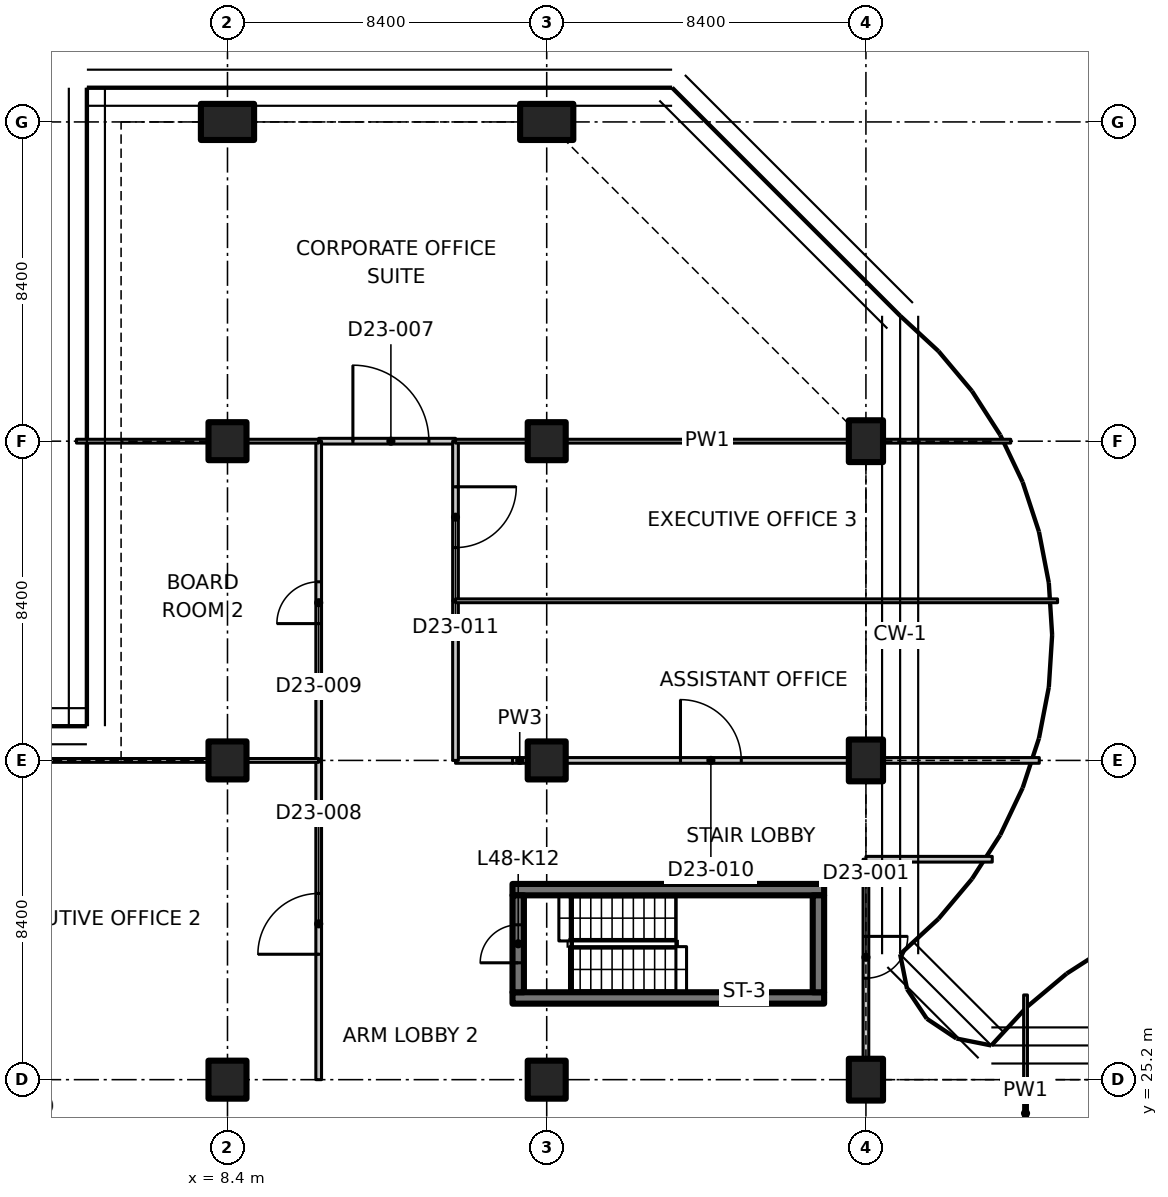
"""IFC4 building model, lengths in metres.
Left out: names, types, materials, properties, quantities, classifications, styles, units other than length and angle.
Written with IfcOpenShell. Run it as: python <this file> out.ifc"""

import sys

from ifc_helpers import new_model, si_unit, direction, frame, frame_2d, origin, origin_2d, place, context, subcontext, project, spatial, polyline, rectangle, outline, extrude, element, fill, save


model = new_model("IFC4")
c1 = context("Model", 3, precision=1e-05, world=origin(), true_north=direction((0.0, 1.0)))
c2 = subcontext(c1, "Body", "Model", "MODEL_VIEW")
j1 = project(units=[si_unit("LENGTHUNIT", "METRE"), si_unit("PLANEANGLEUNIT", "RADIAN")], contexts=[c1])
p1 = place(None, origin())
s1 = spatial("IfcSite", under=j1, at=p1, CompositionType="ELEMENT")
p2 = place(p1, origin())
s2 = spatial("IfcBuilding", under=s1, at=p2, CompositionType="ELEMENT")
p3 = place(p2, frame((0.0, 0.0, 192.0)))
s3 = spatial("IfcBuildingStorey", under=s2, at=p3, CompositionType="ELEMENT", Elevation=192.0)
for number, where, z_axis, x_axis in (
    (1, (8.4, 25.2, 0.0), (0.0, 0.0, 1.0), (1.0, 0.0, 0.0)),
    (2, (8.4, 33.6, 0.0), (0.0, 0.0, 1.0), (1.0, 0.0, 0.0)),
    (3, (8.4, 42.0, 0.0), (0.0, 0.0, 1.0), (1.0, 0.0, 0.0)),
):
    element("IfcColumn", number, at=place(p3, frame(where, z_axis=z_axis, x_axis=x_axis)), inside=s3, PredefinedType="COLUMN", context=c2, shape_type="SweptSolid", body=[
        extrude(rectangle(XDim=1.0, YDim=1.0, at=origin_2d()), origin(), (0.0, 0.0, 1.0), 3.35),
    ])
p4 = place(p3, frame((8.4, 50.4, 0.0), z_axis=(0.0, 0.0, 1.0), x_axis=(0.0, 1.0, 0.0)))
e4 = element("IfcColumn", 4, at=p4, inside=s3, PredefinedType="COLUMN", context=c2, shape_type="SweptSolid", body=[
    extrude(rectangle(XDim=0.95, YDim=1.4, at=origin_2d()), origin(), (0.0, 0.0, 1.0), 3.35),
])
for number, where, z_axis, x_axis in (
    (5, (16.8, 25.2, 0.0), (0.0, 0.0, 1.0), (1.0, 0.0, 0.0)),
    (6, (16.8, 33.6, 0.0), (0.0, 0.0, 1.0), (1.0, 0.0, 0.0)),
    (7, (16.8, 42.0, 0.0), (0.0, 0.0, 1.0), (1.0, 0.0, 0.0)),
):
    element("IfcColumn", number, at=place(p3, frame(where, z_axis=z_axis, x_axis=x_axis)), inside=s3, PredefinedType="COLUMN", context=c2, shape_type="SweptSolid", body=[
        extrude(rectangle(XDim=1.0, YDim=1.0, at=origin_2d()), origin(), (0.0, 0.0, 1.0), 3.35),
    ])
p5 = place(p3, frame((16.8, 50.4, 0.0), z_axis=(0.0, 0.0, 1.0), x_axis=(0.0, 1.0, 0.0)))
e8 = element("IfcColumn", 8, at=p5, inside=s3, PredefinedType="COLUMN", context=c2, shape_type="SweptSolid", body=[
    extrude(rectangle(XDim=0.95, YDim=1.4, at=origin_2d()), origin(), (0.0, 0.0, 1.0), 3.35),
])
for number, where, z_axis, x_axis in (
    (9, (25.2, 25.2, 0.0), (0.0, 0.0, 1.0), (1.0, 0.0, 0.0)),
    (10, (25.2, 33.6, 0.0), (0.0, 0.0, 1.0), (1.0, 0.0, 0.0)),
    (11, (25.2, 42.0, 0.0), (0.0, 0.0, 1.0), (1.0, 0.0, 0.0)),
):
    element("IfcColumn", number, at=place(p3, frame(where, z_axis=z_axis, x_axis=x_axis)), inside=s3, PredefinedType="COLUMN", context=c2, shape_type="SweptSolid", body=[
        extrude(rectangle(XDim=0.9, YDim=1.1, at=origin_2d()), origin(), (0.0, 0.0, 1.0), 3.35),
    ])
for number, where, z_axis, x_axis in (
    (12, (15.9, 27.35, 0.0), (0.0, 0.0, 1.0), (1.0, 0.0, 0.0)),
    (13, (15.9, 30.2, 0.0), (0.0, 0.0, 1.0), (1.0, 0.0, 0.0)),
):
    element("IfcWall", number, at=place(p3, frame(where, z_axis=z_axis, x_axis=x_axis)), inside=s3, PredefinedType="SHEAR", context=c2, shape_type="SweptSolid", body=[
        extrude(rectangle(XDim=8.2, YDim=0.3, at=frame_2d((4.1, 0.0))), origin(), (0.0, 0.0, 1.0), 3.35),
    ])
p6 = place(p3, frame((16.05, 27.5, 0.0), z_axis=(0.0, 0.0, 1.0), x_axis=(0.0, 1.0, 0.0)))
e14 = element("IfcWall", 14, at=p6, inside=s3, PredefinedType="SHEAR", context=c2, shape_type="SweptSolid", body=[
    extrude(rectangle(XDim=2.55, YDim=0.3, at=frame_2d((1.275, 0.0))), origin(), (0.0, 0.0, 1.0), 3.35),
])
p7 = place(p6, frame((0.775, 0.0, 0.0)))
e15 = element("IfcOpeningElement", 15, at=p7, cuts=e14, PredefinedType="OPENING", context=c2, shape_type="SweptSolid", body=[
    extrude(rectangle(XDim=1.0, YDim=2.1, at=frame_2d((0.5, 1.05))), frame((0.0, 0.16, 0.0), z_axis=(0.0, -1.0, 0.0), x_axis=(1.0, 0.0, 0.0)), (0.0, 0.0, 1.0), 0.32),
])
p8 = place(p3, frame((23.95, 27.5, 0.0), z_axis=(0.0, 0.0, 1.0), x_axis=(0.0, 1.0, 0.0)))
e16 = element("IfcWall", 16, at=p8, inside=s3, PredefinedType="SHEAR", context=c2, shape_type="SweptSolid", body=[
    extrude(rectangle(XDim=2.55, YDim=0.3, at=frame_2d((1.275, 0.0))), origin(), (0.0, 0.0, 1.0), 3.35),
])
p9 = place(p3, frame((29.4, 27.429, 0.0), z_axis=(0.0, 0.0, 1.0), x_axis=(0.0, -1.0, 0.0)))
e17 = element("IfcWall", 17, at=p9, inside=s3, PredefinedType="PARTITIONING", context=c2, shape_type="SweptSolid", body=[
    extrude(outline(polyline([(0.0, 0.0), (6.229, 0.0), (6.229, 3.33), (2.679, 3.33), (2.677, 2.98), (1.781, 2.98), (1.779, 3.33), (0.154, 3.33), (0.0, 3.33), (0.0, 0.0)])), frame((0.0, 0.05, 0.0), z_axis=(0.0, -1.0, 0.0), x_axis=(1.0, 0.0, 0.0)), (0.0, 0.0, 1.0), 0.1),
])
p10 = place(p3, frame((25.2, 31.0, 0.0), z_axis=(0.0, 0.0, 1.0), x_axis=(0.0, -1.0, 0.0)))
e18 = element("IfcWall", 18, at=p10, inside=s3, PredefinedType="PARTITIONING", context=c2, shape_type="SweptSolid", body=[
    extrude(outline(polyline([(0.0, 0.0), (5.23, 0.0), (5.23, 2.98), (0.0, 2.98), (0.0, 0.0)])), frame((0.0, 0.075, 0.0), z_axis=(0.0, -1.0, 0.0), x_axis=(1.0, 0.0, 0.0)), (0.0, 0.0, 1.0), 0.15),
])
p11 = place(p10, frame((2.03, 0.0, 0.0)))
e19 = element("IfcOpeningElement", 19, at=p11, cuts=e18, PredefinedType="OPENING", context=c2, shape_type="SweptSolid", body=[
    extrude(rectangle(XDim=1.1, YDim=2.1, at=frame_2d((0.55, 1.05))), frame((0.0, 0.085, 0.0), z_axis=(0.0, -1.0, 0.0), x_axis=(1.0, 0.0, 0.0)), (0.0, 0.0, 1.0), 0.17),
])
p12 = place(p3, frame((25.2, 31.0, 0.0), z_axis=(0.0, 0.0, 1.0), x_axis=(1.0, 0.0, 0.0)))
e20 = element("IfcWall", 20, at=p12, inside=s3, PredefinedType="PARTITIONING", context=c2, shape_type="SweptSolid", body=[
    extrude(rectangle(XDim=3.324, YDim=0.15, at=frame_2d((1.662, 0.0))), origin(), (0.0, 0.0, 1.0), 2.98),
])
p13 = place(p3, frame((10.8, 25.2, 0.0), z_axis=(0.0, 0.0, 1.0), x_axis=(0.0, 1.0, 0.0)))
e21 = element("IfcWall", 21, at=p13, inside=s3, PredefinedType="PARTITIONING", context=c2, shape_type="SweptSolid", body=[
    extrude(rectangle(XDim=8.4, YDim=0.15, at=frame_2d((4.2, 0.0))), origin(), (0.0, 0.0, 1.0), 3.33),
])
p14 = place(p13, frame((3.3, 0.0, 0.0)))
e22 = element("IfcOpeningElement", 22, at=p14, cuts=e21, PredefinedType="OPENING", context=c2, shape_type="SweptSolid", body=[
    extrude(rectangle(XDim=1.6, YDim=2.1, at=frame_2d((0.8, 1.05))), frame((0.0, 0.085, 0.0), z_axis=(0.0, -1.0, 0.0), x_axis=(1.0, 0.0, 0.0)), (0.0, 0.0, 1.0), 0.17),
])
p15 = place(p3, frame((14.4, 33.6, 0.0), z_axis=(0.0, 0.0, 1.0), x_axis=(1.0, 0.0, 0.0)))
e23 = element("IfcWall", 23, at=p15, inside=s3, PredefinedType="PARTITIONING", context=c2, shape_type="SweptSolid", body=[
    extrude(rectangle(XDim=1.5, YDim=0.15, at=frame_2d((0.75, 0.0))), origin(), (0.0, 0.0, 1.0), 3.33),
])
p16 = place(p3, frame((15.9, 33.6, 0.0), z_axis=(0.0, 0.0, 1.0), x_axis=(1.0, 0.0, 0.0)))
e24 = element("IfcWall", 24, at=p16, inside=s3, PredefinedType="PARTITIONING", context=c2, shape_type="SweptSolid", body=[
    extrude(rectangle(XDim=0.38, YDim=0.15, at=frame_2d((0.19, 0.0))), origin(), (0.0, 0.0, 1.0), 3.33),
])
p17 = place(p3, frame((17.32, 33.6, 0.0), z_axis=(0.0, 0.0, 1.0), x_axis=(1.0, 0.0, 0.0)))
e25 = element("IfcWall", 25, at=p17, inside=s3, PredefinedType="PARTITIONING", context=c2, shape_type="SweptSolid", body=[
    extrude(rectangle(XDim=7.41, YDim=0.15, at=frame_2d((3.705, 0.0))), origin(), (0.0, 0.0, 1.0), 3.33),
])
p18 = place(p17, frame((3.0, 0.0, 0.0)))
e26 = element("IfcOpeningElement", 26, at=p18, cuts=e25, PredefinedType="OPENING", context=c2, shape_type="SweptSolid", body=[
    extrude(rectangle(XDim=1.6, YDim=2.1, at=frame_2d((0.8, 1.05))), frame((0.0, 0.085, 0.0), z_axis=(0.0, -1.0, 0.0), x_axis=(1.0, 0.0, 0.0)), (0.0, 0.0, 1.0), 0.17),
])
p19 = place(p3, frame((25.67, 33.6, 0.0), z_axis=(0.0, 0.0, 1.0), x_axis=(1.0, 0.0, 0.0)))
e27 = element("IfcWall", 27, at=p19, inside=s3, PredefinedType="PARTITIONING", context=c2, shape_type="SweptSolid", body=[
    extrude(rectangle(XDim=4.092, YDim=0.15, at=frame_2d((2.046, 0.0))), origin(), (0.0, 0.0, 1.0), 2.98),
])
p20 = place(p3, frame((10.8, 42.0, 0.0), z_axis=(0.0, 0.0, 1.0), x_axis=(1.0, 0.0, 0.0)))
e28 = element("IfcWall", 28, at=p20, inside=s3, PredefinedType="PARTITIONING", context=c2, shape_type="SweptSolid", body=[
    extrude(rectangle(XDim=3.6, YDim=0.15, at=frame_2d((1.8, 0.0))), origin(), (0.0, 0.0, 1.0), 3.33),
])
p21 = place(p20, frame((0.9, 0.0, 0.0)))
e29 = element("IfcOpeningElement", 29, at=p21, cuts=e28, PredefinedType="OPENING", context=c2, shape_type="SweptSolid", body=[
    extrude(rectangle(XDim=2.0, YDim=2.4, at=frame_2d((1.0, 1.2))), frame((0.0, 0.085, 0.0), z_axis=(0.0, -1.0, 0.0), x_axis=(1.0, 0.0, 0.0)), (0.0, 0.0, 1.0), 0.17),
])
p22 = place(p3, frame((10.8, 33.6, 0.0), z_axis=(0.0, 0.0, 1.0), x_axis=(0.0, 1.0, 0.0)))
e30 = element("IfcWall", 30, at=p22, inside=s3, PredefinedType="PARTITIONING", context=c2, shape_type="SweptSolid", body=[
    extrude(rectangle(XDim=8.4, YDim=0.15, at=frame_2d((4.2, 0.0))), origin(), (0.0, 0.0, 1.0), 3.33),
])
p23 = place(p22, frame((3.6, 0.0, 0.0)))
e31 = element("IfcOpeningElement", 31, at=p23, cuts=e30, PredefinedType="OPENING", context=c2, shape_type="SweptSolid", body=[
    extrude(rectangle(XDim=1.1, YDim=2.1, at=frame_2d((0.55, 1.05))), frame((0.0, 0.085, 0.0), z_axis=(0.0, -1.0, 0.0), x_axis=(1.0, 0.0, 0.0)), (0.0, 0.0, 1.0), 0.17),
])
p24 = place(p3, frame((14.4, 37.8, 0.0), z_axis=(0.0, 0.0, 1.0), x_axis=(0.0, -1.0, 0.0)))
e32 = element("IfcWall", 32, at=p24, inside=s3, PredefinedType="PARTITIONING", context=c2, shape_type="SweptSolid", body=[
    extrude(rectangle(XDim=4.2, YDim=0.15, at=frame_2d((2.1, 0.0))), origin(), (0.0, 0.0, 1.0), 3.33),
])
p25 = place(p3, frame((14.4, 42.0, 0.0), z_axis=(0.0, 0.0, 1.0), x_axis=(0.0, -1.0, 0.0)))
e33 = element("IfcWall", 33, at=p25, inside=s3, PredefinedType="PARTITIONING", context=c2, shape_type="SweptSolid", body=[
    extrude(rectangle(XDim=4.2, YDim=0.15, at=frame_2d((2.1, 0.0))), origin(), (0.0, 0.0, 1.0), 3.33),
])
p26 = place(p25, frame((1.2, 0.0, 0.0)))
e34 = element("IfcOpeningElement", 34, at=p26, cuts=e33, PredefinedType="OPENING", context=c2, shape_type="SweptSolid", body=[
    extrude(rectangle(XDim=1.6, YDim=2.1, at=frame_2d((0.8, 1.05))), frame((0.0, 0.085, 0.0), z_axis=(0.0, -1.0, 0.0), x_axis=(1.0, 0.0, 0.0)), (0.0, 0.0, 1.0), 0.17),
])
p27 = place(p3, frame((10.8, 42.0, 0.0), z_axis=(0.0, 0.0, 1.0), x_axis=(-1.0, 0.0, 0.0)))
e35 = element("IfcWall", 35, at=p27, inside=s3, PredefinedType="PARTITIONING", context=c2, shape_type="SweptSolid", body=[
    extrude(rectangle(XDim=1.88, YDim=0.1, at=frame_2d((0.94, 0.0))), origin(), (0.0, 0.0, 1.0), 3.33),
])
p28 = place(p3, frame((7.88, 42.0, 0.0), z_axis=(0.0, 0.0, 1.0), x_axis=(-1.0, 0.0, 0.0)))
e36 = element("IfcWall", 36, at=p28, inside=s3, PredefinedType="PARTITIONING", context=c2, shape_type="SweptSolid", body=[
    extrude(rectangle(XDim=3.454, YDim=0.1, at=frame_2d((1.727, 0.0))), origin(), (0.0, 0.0, 1.0), 2.98),
])
p29 = place(p3, frame((29.011, 42.0, 0.0), z_axis=(0.0, 0.0, 1.0), x_axis=(-1.0, 0.0, 0.0)))
e37 = element("IfcWall", 37, at=p29, inside=s3, PredefinedType="PARTITIONING", context=c2, shape_type="SweptSolid", body=[
    extrude(rectangle(XDim=3.342, YDim=0.1, at=frame_2d((1.671, 0.0))), origin(), (0.0, 0.0, 1.0), 2.98),
])
p30 = place(p3, frame((24.73, 42.0, 0.0), z_axis=(0.0, 0.0, 1.0), x_axis=(-1.0, 0.0, 0.0)))
e38 = element("IfcWall", 38, at=p30, inside=s3, PredefinedType="PARTITIONING", context=c2, shape_type="SweptSolid", body=[
    extrude(outline(polyline([(0.0, 0.0), (7.41, 0.0), (7.41, 3.33), (0.196, 3.33), (0.194, 2.98), (0.0, 2.98), (0.0, 0.0)])), frame((0.0, 0.05, 0.0), z_axis=(0.0, -1.0, 0.0), x_axis=(1.0, 0.0, 0.0)), (0.0, 0.0, 1.0), 0.1),
])
p31 = place(p3, frame((16.28, 42.0, 0.0), z_axis=(0.0, 0.0, 1.0), x_axis=(-1.0, 0.0, 0.0)))
e39 = element("IfcWall", 39, at=p31, inside=s3, PredefinedType="PARTITIONING", context=c2, shape_type="SweptSolid", body=[
    extrude(rectangle(XDim=1.88, YDim=0.1, at=frame_2d((0.94, 0.0))), origin(), (0.0, 0.0, 1.0), 3.33),
])
p32 = place(p3, frame((0.47, 33.6, 0.0), z_axis=(0.0, 0.0, 1.0), x_axis=(1.0, 0.0, 0.0)))
e40 = element("IfcWall", 40, at=p32, inside=s3, PredefinedType="PARTITIONING", context=c2, shape_type="SweptSolid", body=[
    extrude(outline(polyline([(0.0, 0.0), (7.41, 0.0), (7.41, 2.98), (0.0, 2.98), (0.0, 0.0)])), frame((0.0, 0.05, 0.0), z_axis=(0.0, -1.0, 0.0), x_axis=(1.0, 0.0, 0.0)), (0.0, 0.0, 1.0), 0.1),
])
p33 = place(p3, frame((8.92, 33.6, 0.0), z_axis=(0.0, 0.0, 1.0), x_axis=(1.0, 0.0, 0.0)))
e41 = element("IfcWall", 41, at=p33, inside=s3, PredefinedType="PARTITIONING", context=c2, shape_type="SweptSolid", body=[
    extrude(rectangle(XDim=1.88, YDim=0.1, at=frame_2d((0.94, 0.0))), origin(), (0.0, 0.0, 1.0), 3.33),
])
p34 = place(p3, frame((14.4, 37.8, 0.0), z_axis=(0.0, 0.0, 1.0), x_axis=(1.0, 0.0, 0.0)))
e42 = element("IfcWall", 42, at=p34, inside=s3, PredefinedType="PARTITIONING", context=c2, shape_type="SweptSolid", body=[
    extrude(outline(polyline([(0.0, 0.0), (15.843, 0.0), (15.843, 3.33), (11.25, 3.33), (11.248, 2.98), (10.352, 2.98), (10.35, 3.33), (0.0, 3.33), (0.0, 0.0)])), frame((0.0, 0.05, 0.0), z_axis=(0.0, -1.0, 0.0), x_axis=(1.0, 0.0, 0.0)), (0.0, 0.0, 1.0), 0.1),
])
p35 = place(p7, origin())
e43 = element("IfcDoor", 43, at=p35, inside=s3, OperationType="SINGLE_SWING_LEFT", PredefinedType="DOOR", context=c2, shape_type="SweptSolid", body=[
    extrude(rectangle(XDim=1.0, YDim=2.1, at=frame_2d((0.5, 1.05))), frame((0.0, 0.025, 0.0), z_axis=(0.0, -1.0, 0.0), x_axis=(1.0, 0.0, 0.0)), (0.0, 0.0, 1.0), 0.05),
])
fill(e15, e43)
p36 = place(p11, origin())
e44 = element("IfcDoor", 44, at=p36, inside=s3, OperationType="SINGLE_SWING_RIGHT", PredefinedType="DOOR", context=c2, shape_type="SweptSolid", body=[
    extrude(rectangle(XDim=1.1, YDim=2.1, at=frame_2d((0.55, 1.05))), frame((0.0, 0.025, 0.0), z_axis=(0.0, -1.0, 0.0), x_axis=(1.0, 0.0, 0.0)), (0.0, 0.0, 1.0), 0.05),
])
fill(e19, e44)
p37 = place(p21, origin())
e45 = element("IfcDoor", 45, at=p37, inside=s3, OperationType="DOUBLE_DOOR_SINGLE_SWING", PredefinedType="DOOR", context=c2, shape_type="SweptSolid", body=[
    extrude(rectangle(XDim=2.0, YDim=2.4, at=frame_2d((1.0, 1.2))), frame((0.0, 0.025, 0.0), z_axis=(0.0, -1.0, 0.0), x_axis=(1.0, 0.0, 0.0)), (0.0, 0.0, 1.0), 0.05),
])
fill(e29, e45)
p38 = place(p14, origin())
e46 = element("IfcDoor", 46, at=p38, inside=s3, OperationType="DOUBLE_DOOR_SINGLE_SWING", PredefinedType="DOOR", context=c2, shape_type="SweptSolid", body=[
    extrude(rectangle(XDim=1.6, YDim=2.1, at=frame_2d((0.8, 1.05))), frame((0.0, 0.025, 0.0), z_axis=(0.0, -1.0, 0.0), x_axis=(1.0, 0.0, 0.0)), (0.0, 0.0, 1.0), 0.05),
])
fill(e22, e46)
p39 = place(p23, origin())
e47 = element("IfcDoor", 47, at=p39, inside=s3, OperationType="SINGLE_SWING_LEFT", PredefinedType="DOOR", context=c2, shape_type="SweptSolid", body=[
    extrude(rectangle(XDim=1.1, YDim=2.1, at=frame_2d((0.55, 1.05))), frame((0.0, 0.025, 0.0), z_axis=(0.0, -1.0, 0.0), x_axis=(1.0, 0.0, 0.0)), (0.0, 0.0, 1.0), 0.05),
])
fill(e31, e47)
p40 = place(p18, origin())
e48 = element("IfcDoor", 48, at=p40, inside=s3, OperationType="DOUBLE_DOOR_SINGLE_SWING", PredefinedType="DOOR", context=c2, shape_type="SweptSolid", body=[
    extrude(rectangle(XDim=1.6, YDim=2.1, at=frame_2d((0.8, 1.05))), frame((0.0, 0.025, 0.0), z_axis=(0.0, -1.0, 0.0), x_axis=(1.0, 0.0, 0.0)), (0.0, 0.0, 1.0), 0.05),
])
fill(e26, e48)
p41 = place(p26, origin())
e49 = element("IfcDoor", 49, at=p41, inside=s3, OperationType="DOUBLE_DOOR_SINGLE_SWING", PredefinedType="DOOR", context=c2, shape_type="SweptSolid", body=[
    extrude(rectangle(XDim=1.6, YDim=2.1, at=frame_2d((0.8, 1.05))), frame((0.0, 0.025, 0.0), z_axis=(0.0, -1.0, 0.0), x_axis=(1.0, 0.0, 0.0)), (0.0, 0.0, 1.0), 0.05),
])
fill(e34, e49)
save(model, sys.argv[1])
